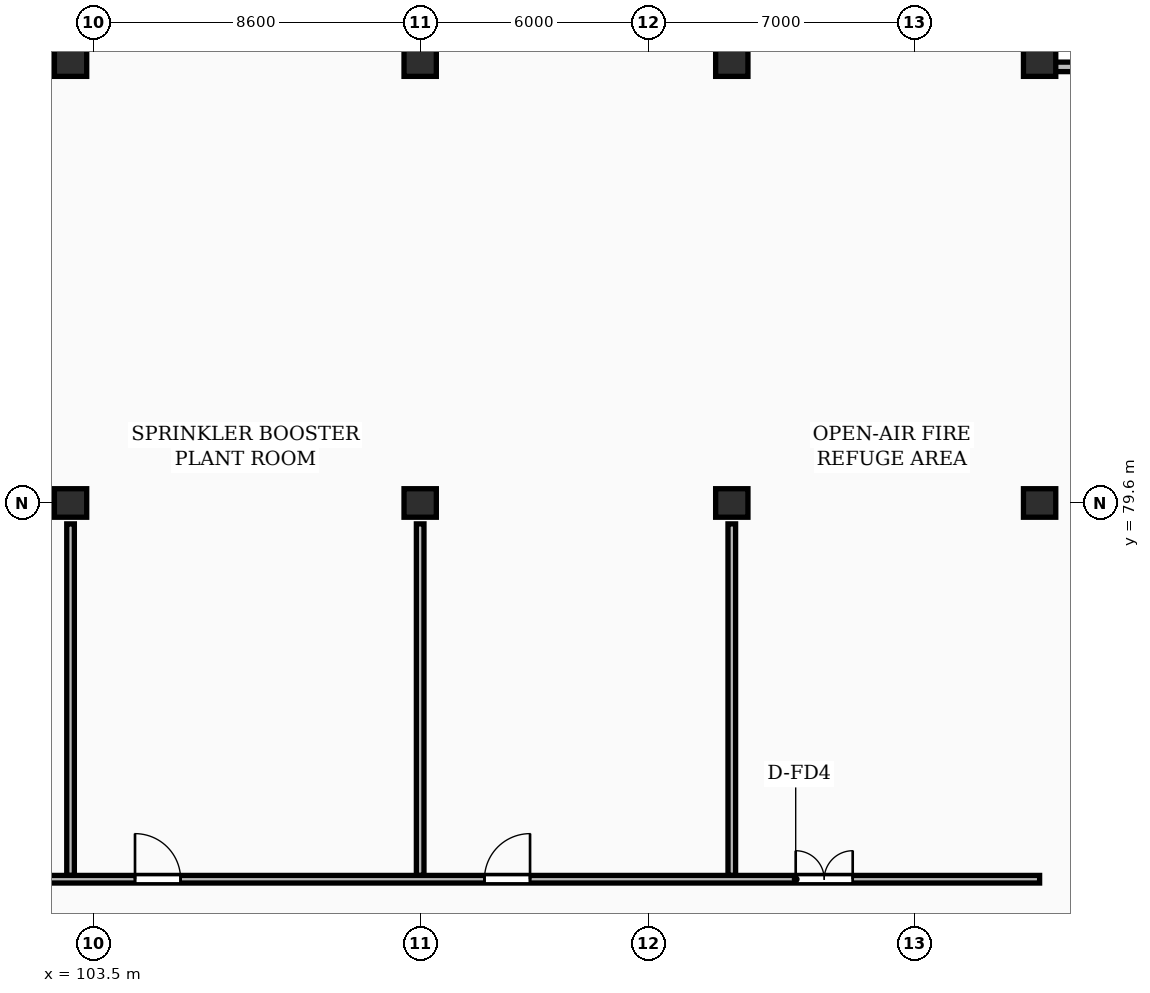
"""IFC4 building model, lengths in metres.
Left out: names, types, materials, properties, quantities, classifications, styles, units other than length and angle.
Written with IfcOpenShell. Run it as: python <this file> out.ifc"""

import sys

from ifc_helpers import new_model, si_unit, direction, frame, frame_2d, origin, origin_2d, place, context, subcontext, project, spatial, rectangle, extrude, element, fill, save


model = new_model("IFC4")
c1 = context("Model", 3, precision=1e-05, world=origin(), true_north=direction((0.0, 1.0)))
c2 = subcontext(c1, "Body", "Model", "MODEL_VIEW")
j1 = project(units=[si_unit("LENGTHUNIT", "METRE"), si_unit("PLANEANGLEUNIT", "RADIAN")], contexts=[c1])
p1 = place(None, origin())
s1 = spatial("IfcSite", under=j1, at=p1, CompositionType="ELEMENT")
p2 = place(p1, origin())
s2 = spatial("IfcBuilding", under=s1, at=p2, CompositionType="ELEMENT")
p3 = place(p2, frame((0.0, 0.0, 223.85)))
s3 = spatial("IfcBuildingStorey", under=s2, at=p3, CompositionType="ELEMENT", Elevation=223.85)
for number, where, z_axis, x_axis in (
    (1, (102.9, 79.6, 0.0), (0.0, 0.0, 1.0), (1.0, 0.0, 0.0)),
    (2, (102.9, 91.2, 0.0), (0.0, 0.0, 1.0), (1.0, 0.0, 0.0)),
    (3, (112.1, 79.6, 0.0), (0.0, 0.0, 1.0), (1.0, 0.0, 0.0)),
    (4, (112.1, 91.2, 0.0), (0.0, 0.0, 1.0), (1.0, 0.0, 0.0)),
    (5, (120.3, 79.6, 0.0), (0.0, 0.0, 1.0), (1.0, 0.0, 0.0)),
    (6, (120.3, 91.2, 0.0), (0.0, 0.0, 1.0), (1.0, 0.0, 0.0)),
    (7, (128.4, 79.6, 0.0), (0.0, 0.0, 1.0), (1.0, 0.0, 0.0)),
    (8, (128.4, 91.2, 0.0), (0.0, 0.0, 1.0), (1.0, 0.0, 0.0)),
):
    element("IfcColumn", number, at=place(p3, frame(where, z_axis=z_axis, x_axis=x_axis)), inside=s3, PredefinedType="COLUMN", context=c2, shape_type="SweptSolid", body=[
        extrude(rectangle(XDim=0.85, YDim=0.75, at=origin_2d()), origin(), (0.0, 0.0, 1.0), 4.8),
    ])
for number, where, z_axis, x_axis in (
    (9, (132.0, 91.075, 0.0), (0.0, 0.0, 1.0), (-1.0, 0.0, 0.0)),
    (10, (128.275, 91.2, 0.0), (0.0, 0.0, 1.0), (0.0, 1.0, 0.0)),
):
    element("IfcWall", number, at=place(p3, frame(where, z_axis=z_axis, x_axis=x_axis)), inside=s3, PredefinedType="SHEAR", context=c2, shape_type="SweptSolid", body=[
        extrude(rectangle(XDim=3.6, YDim=0.25, at=frame_2d((1.8, 0.0))), origin(), (0.0, 0.0, 1.0), 4.48),
    ])
for number, where, z_axis, x_axis in (
    (11, (102.9, 69.8, 0.0), (0.0, 0.0, 1.0), (0.0, 1.0, 0.0)),
    (12, (112.1, 69.8, 0.0), (0.0, 0.0, 1.0), (0.0, 1.0, 0.0)),
    (13, (120.3, 69.8, 0.0), (0.0, 0.0, 1.0), (0.0, 1.0, 0.0)),
):
    element("IfcWall", number, at=place(p3, frame(where, z_axis=z_axis, x_axis=x_axis)), inside=s3, PredefinedType="PARTITIONING", context=c2, shape_type="SweptSolid", body=[
        extrude(rectangle(XDim=9.25, YDim=0.2, at=frame_2d((4.625, 0.0))), origin(), (0.0, 0.0, 1.0), 3.23),
    ])
p4 = place(p3, frame((59.8, 69.7, 0.0), z_axis=(0.0, 0.0, 1.0), x_axis=(1.0, 0.0, 0.0)))
e14 = element("IfcWall", 14, at=p4, inside=s3, PredefinedType="PARTITIONING", context=c2, shape_type="SweptSolid", body=[
    extrude(rectangle(XDim=68.6, YDim=0.2, at=frame_2d((34.3, 0.0))), origin(), (0.0, 0.0, 1.0), 4.48),
])
p5 = place(p4, frame((5.372, 0.0, 0.0)))
e15 = element("IfcOpeningElement", 15, at=p5, cuts=e14, PredefinedType="OPENING", context=c2, shape_type="SweptSolid", body=[
    extrude(rectangle(XDim=1.2, YDim=2.15, at=frame_2d((0.6, 1.075))), frame((0.0, 0.11, 0.0), z_axis=(0.0, -1.0, 0.0), x_axis=(1.0, 0.0, 0.0)), (0.0, 0.0, 1.0), 0.22),
])
p6 = place(p4, frame((13.421, 0.0, 0.0)))
e16 = element("IfcOpeningElement", 16, at=p6, cuts=e14, PredefinedType="OPENING", context=c2, shape_type="SweptSolid", body=[
    extrude(rectangle(XDim=1.2, YDim=2.15, at=frame_2d((0.6, 1.075))), frame((0.0, 0.11, 0.0), z_axis=(0.0, -1.0, 0.0), x_axis=(1.0, 0.0, 0.0)), (0.0, 0.0, 1.0), 0.22),
])
p7 = place(p4, frame((21.884, 0.0, 0.0)))
e17 = element("IfcOpeningElement", 17, at=p7, cuts=e14, PredefinedType="OPENING", context=c2, shape_type="SweptSolid", body=[
    extrude(rectangle(XDim=1.2, YDim=2.15, at=frame_2d((0.6, 1.075))), frame((0.0, 0.11, 0.0), z_axis=(0.0, -1.0, 0.0), x_axis=(1.0, 0.0, 0.0)), (0.0, 0.0, 1.0), 0.22),
])
p8 = place(p4, frame((31.004, 0.0, 0.0)))
e18 = element("IfcOpeningElement", 18, at=p8, cuts=e14, PredefinedType="OPENING", context=c2, shape_type="SweptSolid", body=[
    extrude(rectangle(XDim=1.2, YDim=2.15, at=frame_2d((0.6, 1.075))), frame((0.0, 0.11, 0.0), z_axis=(0.0, -1.0, 0.0), x_axis=(1.0, 0.0, 0.0)), (0.0, 0.0, 1.0), 0.22),
])
p9 = place(p4, frame((35.596, 0.0, 0.0)))
e19 = element("IfcOpeningElement", 19, at=p9, cuts=e14, PredefinedType="OPENING", context=c2, shape_type="SweptSolid", body=[
    extrude(rectangle(XDim=1.2, YDim=2.15, at=frame_2d((0.6, 1.075))), frame((0.0, 0.11, 0.0), z_axis=(0.0, -1.0, 0.0), x_axis=(1.0, 0.0, 0.0)), (0.0, 0.0, 1.0), 0.22),
])
p10 = place(p4, frame((44.796, 0.0, 0.0)))
e20 = element("IfcOpeningElement", 20, at=p10, cuts=e14, PredefinedType="OPENING", context=c2, shape_type="SweptSolid", body=[
    extrude(rectangle(XDim=1.2, YDim=2.15, at=frame_2d((0.6, 1.075))), frame((0.0, 0.11, 0.0), z_axis=(0.0, -1.0, 0.0), x_axis=(1.0, 0.0, 0.0)), (0.0, 0.0, 1.0), 0.22),
])
p11 = place(p4, frame((53.991, 0.0, 0.0)))
e21 = element("IfcOpeningElement", 21, at=p11, cuts=e14, PredefinedType="OPENING", context=c2, shape_type="SweptSolid", body=[
    extrude(rectangle(XDim=1.2, YDim=2.15, at=frame_2d((0.6, 1.075))), frame((0.0, 0.11, 0.0), z_axis=(0.0, -1.0, 0.0), x_axis=(1.0, 0.0, 0.0)), (0.0, 0.0, 1.0), 0.22),
])
p12 = place(p4, frame((62.182, 0.0, 0.0)))
e22 = element("IfcOpeningElement", 22, at=p12, cuts=e14, PredefinedType="OPENING", context=c2, shape_type="SweptSolid", body=[
    extrude(rectangle(XDim=1.5, YDim=2.18, at=frame_2d((0.75, 1.09))), frame((0.0, 0.11, 0.0), z_axis=(0.0, -1.0, 0.0), x_axis=(1.0, 0.0, 0.0)), (0.0, 0.0, 1.0), 0.22),
])
p13 = place(p10, origin())
e23 = element("IfcDoor", 23, at=p13, inside=s3, OperationType="SINGLE_SWING_LEFT", PredefinedType="DOOR", context=c2, shape_type="SweptSolid", body=[
    extrude(rectangle(XDim=1.2, YDim=2.15, at=frame_2d((0.6, 1.075))), frame((0.0, 0.025, 0.0), z_axis=(0.0, -1.0, 0.0), x_axis=(1.0, 0.0, 0.0)), (0.0, 0.0, 1.0), 0.05),
])
fill(e20, e23)
p14 = place(p11, origin())
e24 = element("IfcDoor", 24, at=p14, inside=s3, OperationType="SINGLE_SWING_RIGHT", PredefinedType="DOOR", context=c2, shape_type="SweptSolid", body=[
    extrude(rectangle(XDim=1.2, YDim=2.15, at=frame_2d((0.6, 1.075))), frame((0.0, 0.025, 0.0), z_axis=(0.0, -1.0, 0.0), x_axis=(1.0, 0.0, 0.0)), (0.0, 0.0, 1.0), 0.05),
])
fill(e21, e24)
p15 = place(p12, origin())
e25 = element("IfcDoor", 25, at=p15, inside=s3, OperationType="DOUBLE_DOOR_SINGLE_SWING", PredefinedType="DOOR", context=c2, shape_type="SweptSolid", body=[
    extrude(rectangle(XDim=1.5, YDim=2.18, at=frame_2d((0.75, 1.09))), frame((0.0, 0.025, 0.0), z_axis=(0.0, -1.0, 0.0), x_axis=(1.0, 0.0, 0.0)), (0.0, 0.0, 1.0), 0.05),
])
fill(e22, e25)
save(model, sys.argv[1])
